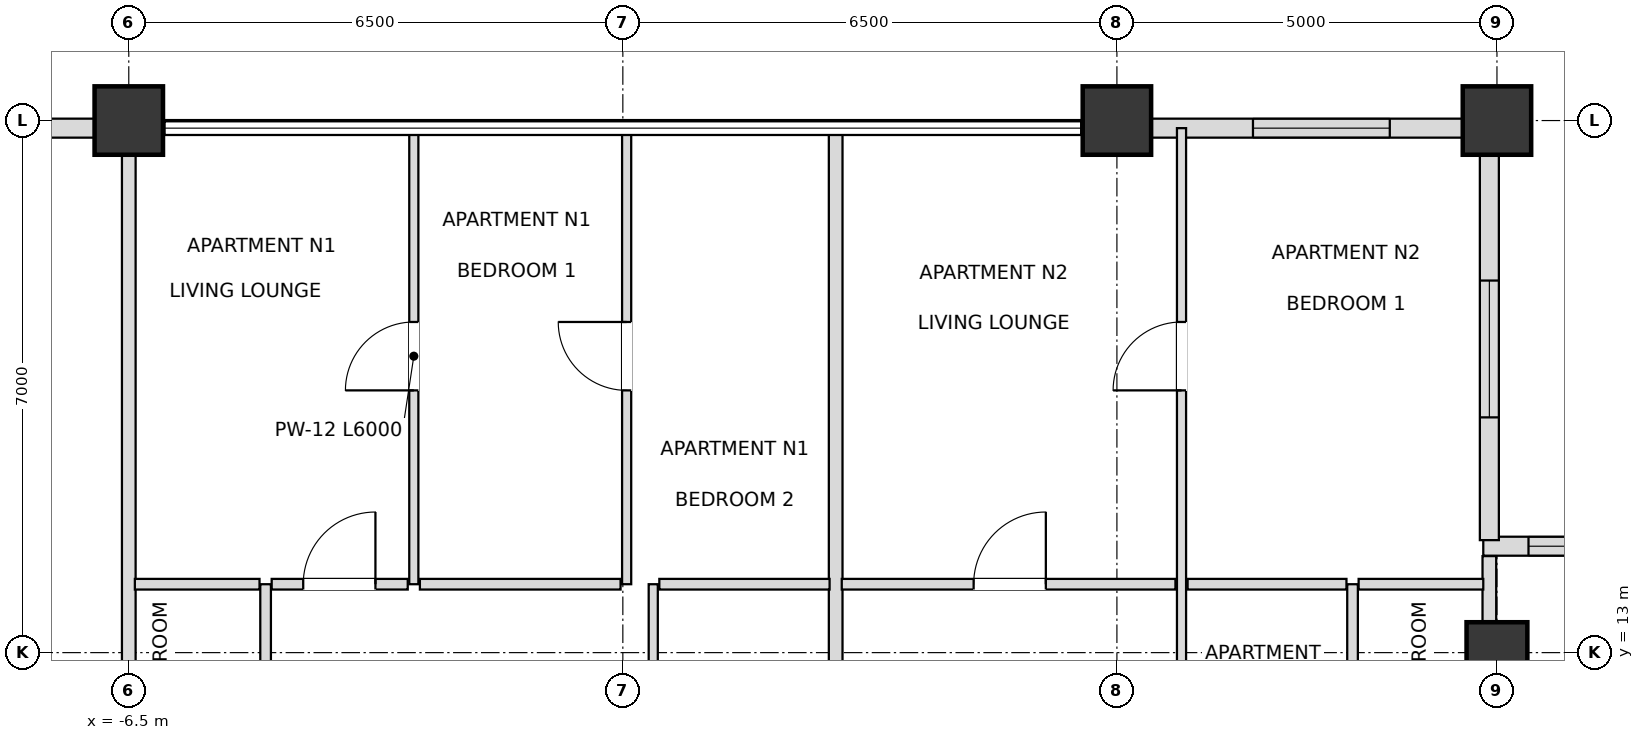
"""IFC4 building model, lengths in metres.
Left out: names, types, materials, properties, quantities, classifications, styles, units other than length and angle.
Written with IfcOpenShell. Run it as: python <this file> out.ifc"""

import sys

from ifc_helpers import new_model, si_unit, direction, frame, frame_2d, origin, origin_2d, place, context, subcontext, project, spatial, rectangle, extrude, element, fill, save


model = new_model("IFC4")
c1 = context("Model", 3, precision=1e-05, world=origin(), true_north=direction((0.0, 1.0)))
c2 = subcontext(c1, "Body", "Model", "MODEL_VIEW")
j1 = project(units=[si_unit("LENGTHUNIT", "METRE"), si_unit("PLANEANGLEUNIT", "RADIAN")], contexts=[c1])
p1 = place(None, origin())
s1 = spatial("IfcSite", under=j1, at=p1, CompositionType="ELEMENT")
p2 = place(p1, origin())
s2 = spatial("IfcBuilding", under=s1, at=p2, CompositionType="ELEMENT")
p3 = place(p2, frame((0.0, 0.0, 236.7)))
s3 = spatial("IfcBuildingStorey", under=s2, at=p3, CompositionType="ELEMENT", Elevation=236.7)
for number, where, z_axis, x_axis in (
    (1, (11.5, 20.0, 0.0), (0.0, 0.0, 1.0), (1.0, 0.0, 0.0)),
    (2, (6.5, 20.0, 0.0), (0.0, 0.0, 1.0), (1.0, 0.0, 0.0)),
    (3, (-6.5, 20.0, 0.0), (0.0, 0.0, 1.0), (1.0, 0.0, 0.0)),
):
    element("IfcColumn", number, at=place(p3, frame(where, z_axis=z_axis, x_axis=x_axis)), inside=s3, PredefinedType="USERDEFINED", context=c2, shape_type="SweptSolid", body=[
        extrude(rectangle(XDim=0.9, YDim=0.9, at=origin_2d()), origin(), (0.0, 0.0, 1.0), 3.6),
    ])
p4 = place(p3, frame((11.5, 13.0, 0.0), z_axis=(0.0, 0.0, 1.0), x_axis=(1.0, 0.0, 0.0)))
e4 = element("IfcColumn", 4, at=p4, inside=s3, PredefinedType="COLUMN", context=c2, shape_type="SweptSolid", body=[
    extrude(rectangle(XDim=0.8, YDim=0.8, at=origin_2d()), origin(), (0.0, 0.0, 1.0), 3.6),
])
p5 = place(p3, frame((11.055, 19.9, 0.0), z_axis=(0.0, 0.0, 1.0), x_axis=(-1.0, 0.0, 0.0)))
e5 = element("IfcWall", 5, at=p5, inside=s3, PredefinedType="SOLIDWALL", context=c2, shape_type="SweptSolid", body=[
    extrude(rectangle(XDim=4.11, YDim=0.25, at=frame_2d((2.055, 0.0))), origin(), (0.0, 0.0, 1.0), 2.748),
])
p6 = place(p5, frame((0.965, 0.0, 0.72)))
e6 = element("IfcOpeningElement", 6, at=p6, cuts=e5, PredefinedType="OPENING", context=c2, shape_type="SweptSolid", body=[
    extrude(rectangle(XDim=1.8, YDim=1.68, at=frame_2d((0.9, 0.84))), frame((0.0, 0.135, 0.0), z_axis=(0.0, -1.0, 0.0), x_axis=(1.0, 0.0, 0.0)), (0.0, 0.0, 1.0), 0.27),
])
p7 = place(p3, frame((-6.945, 19.9, 0.0), z_axis=(0.0, 0.0, 1.0), x_axis=(-1.0, 0.0, 0.0)))
e7 = element("IfcWall", 7, at=p7, inside=s3, PredefinedType="SOLIDWALL", context=c2, shape_type="SweptSolid", body=[
    extrude(rectangle(XDim=4.11, YDim=0.25, at=frame_2d((2.055, 0.0))), origin(), (0.0, 0.0, 1.0), 2.748),
])
p8 = place(p7, frame((1.155, 0.0, 0.72)))
e8 = element("IfcOpeningElement", 8, at=p8, cuts=e7, PredefinedType="OPENING", context=c2, shape_type="SweptSolid", body=[
    extrude(rectangle(XDim=1.8, YDim=1.68, at=frame_2d((0.9, 0.84))), frame((0.0, 0.135, 0.0), z_axis=(0.0, -1.0, 0.0), x_axis=(1.0, 0.0, 0.0)), (0.0, 0.0, 1.0), 0.27),
])
p9 = place(p3, frame((16.98, 14.4, 0.0), z_axis=(0.0, 0.0, 1.0), x_axis=(-1.0, 0.0, 0.0)))
e9 = element("IfcWall", 9, at=p9, inside=s3, PredefinedType="SOLIDWALL", context=c2, shape_type="SweptSolid", body=[
    extrude(rectangle(XDim=5.66, YDim=0.25, at=frame_2d((2.83, 0.0))), origin(), (0.0, 0.0, 1.0), 2.748),
])
p10 = place(p9, frame((0.595, 0.0, 0.72)))
e10 = element("IfcOpeningElement", 10, at=p10, cuts=e9, PredefinedType="OPENING", context=c2, shape_type="SweptSolid", body=[
    extrude(rectangle(XDim=1.8, YDim=1.68, at=frame_2d((0.9, 0.84))), frame((0.0, 0.135, 0.0), z_axis=(0.0, -1.0, 0.0), x_axis=(1.0, 0.0, 0.0)), (0.0, 0.0, 1.0), 0.27),
])
p11 = place(p9, frame((3.265, 0.0, 0.72)))
e11 = element("IfcOpeningElement", 11, at=p11, cuts=e9, PredefinedType="OPENING", context=c2, shape_type="SweptSolid", body=[
    extrude(rectangle(XDim=1.8, YDim=1.68, at=frame_2d((0.9, 0.84))), frame((0.0, 0.135, 0.0), z_axis=(0.0, -1.0, 0.0), x_axis=(1.0, 0.0, 0.0)), (0.0, 0.0, 1.0), 0.27),
])
p12 = place(p3, frame((11.4, 14.48, 0.0), z_axis=(0.0, 0.0, 1.0), x_axis=(0.0, 1.0, 0.0)))
e12 = element("IfcWall", 12, at=p12, inside=s3, PredefinedType="SOLIDWALL", context=c2, shape_type="SweptSolid", body=[
    extrude(rectangle(XDim=5.34, YDim=0.25, at=frame_2d((2.67, 0.0))), origin(), (0.0, 0.0, 1.0), 2.748),
])
p13 = place(p12, frame((1.615, 0.0, 0.72)))
e13 = element("IfcOpeningElement", 13, at=p13, cuts=e12, PredefinedType="OPENING", context=c2, shape_type="SweptSolid", body=[
    extrude(rectangle(XDim=1.8, YDim=1.68, at=frame_2d((0.9, 0.84))), frame((0.0, 0.135, 0.0), z_axis=(0.0, -1.0, 0.0), x_axis=(1.0, 0.0, 0.0)), (0.0, 0.0, 1.0), 0.27),
])
p14 = place(p3, frame((-6.5, 9.2, 0.0), z_axis=(0.0, 0.0, 1.0), x_axis=(0.0, 1.0, 0.0)))
e14 = element("IfcWall", 14, at=p14, inside=s3, PredefinedType="PARTITIONING", context=c2, shape_type="SweptSolid", body=[
    extrude(rectangle(XDim=10.7, YDim=0.18, at=frame_2d((5.35, 0.0))), origin(), (0.0, 0.0, 1.0), 2.826),
])
p15 = place(p3, frame((-4.7, 9.2, 0.0), z_axis=(0.0, 0.0, 1.0), x_axis=(0.0, 1.0, 0.0)))
e15 = element("IfcWall", 15, at=p15, inside=s3, PredefinedType="PARTITIONING", context=c2, shape_type="SweptSolid", body=[
    extrude(rectangle(XDim=4.7, YDim=0.14, at=frame_2d((2.35, 0.0))), origin(), (0.0, 0.0, 1.0), 3.38),
])
p16 = place(p15, frame((1.9, 0.0, 0.0)))
e16 = element("IfcOpeningElement", 16, at=p16, cuts=e15, PredefinedType="OPENING", context=c2, shape_type="SweptSolid", body=[
    extrude(rectangle(XDim=0.9, YDim=2.1, at=frame_2d((0.45, 1.05))), frame((0.0, 0.08, 0.0), z_axis=(0.0, -1.0, 0.0), x_axis=(1.0, 0.0, 0.0)), (0.0, 0.0, 1.0), 0.16),
])
p17 = place(p3, frame((-2.75, 13.9, 0.0), z_axis=(0.0, 0.0, 1.0), x_axis=(0.0, 1.0, 0.0)))
e17 = element("IfcWall", 17, at=p17, inside=s3, PredefinedType="PARTITIONING", context=c2, shape_type="SweptSolid", body=[
    extrude(rectangle(XDim=6.0, YDim=0.12, at=frame_2d((3.0, 0.0))), origin(), (0.0, 0.0, 1.0), 3.018),
])
p18 = place(p17, frame((2.55, 0.0, 0.0)))
e18 = element("IfcOpeningElement", 18, at=p18, cuts=e17, PredefinedType="OPENING", context=c2, shape_type="SweptSolid", body=[
    extrude(rectangle(XDim=0.9, YDim=2.1, at=frame_2d((0.45, 1.05))), frame((0.0, 0.07, 0.0), z_axis=(0.0, -1.0, 0.0), x_axis=(1.0, 0.0, 0.0)), (0.0, 0.0, 1.0), 0.14),
])
p19 = place(p3, frame((0.05, 13.9, 0.0), z_axis=(0.0, 0.0, 1.0), x_axis=(0.0, 1.0, 0.0)))
e19 = element("IfcWall", 19, at=p19, inside=s3, PredefinedType="PARTITIONING", context=c2, shape_type="SweptSolid", body=[
    extrude(rectangle(XDim=6.0, YDim=0.12, at=frame_2d((3.0, 0.0))), origin(), (0.0, 0.0, 1.0), 3.018),
])
p20 = place(p19, frame((2.55, 0.0, 0.0)))
e20 = element("IfcOpeningElement", 20, at=p20, cuts=e19, PredefinedType="OPENING", context=c2, shape_type="SweptSolid", body=[
    extrude(rectangle(XDim=0.9, YDim=2.1, at=frame_2d((0.45, 1.05))), frame((0.0, 0.07, 0.0), z_axis=(0.0, -1.0, 0.0), x_axis=(1.0, 0.0, 0.0)), (0.0, 0.0, 1.0), 0.14),
])
p21 = place(p3, frame((0.4, 9.2, 0.0), z_axis=(0.0, 0.0, 1.0), x_axis=(0.0, 1.0, 0.0)))
e21 = element("IfcWall", 21, at=p21, inside=s3, PredefinedType="PARTITIONING", context=c2, shape_type="SweptSolid", body=[
    extrude(rectangle(XDim=4.7, YDim=0.12, at=frame_2d((2.35, 0.0))), origin(), (0.0, 0.0, 1.0), 3.38),
])
p22 = place(p21, frame((1.875, 0.0, 0.0)))
e22 = element("IfcOpeningElement", 22, at=p22, cuts=e21, PredefinedType="OPENING", context=c2, shape_type="SweptSolid", body=[
    extrude(rectangle(XDim=0.95, YDim=2.1, at=frame_2d((0.475, 1.05))), frame((0.0, 0.07, 0.0), z_axis=(0.0, -1.0, 0.0), x_axis=(1.0, 0.0, 0.0)), (0.0, 0.0, 1.0), 0.14),
])
p23 = place(p3, frame((2.8, 9.2, 0.0), z_axis=(0.0, 0.0, 1.0), x_axis=(0.0, 1.0, 0.0)))
e23 = element("IfcWall", 23, at=p23, inside=s3, PredefinedType="PARTITIONING", context=c2, shape_type="SweptSolid", body=[
    extrude(rectangle(XDim=10.7, YDim=0.18, at=frame_2d((5.35, 0.0))), origin(), (0.0, 0.0, 1.0), 3.018),
])
p24 = place(p3, frame((7.35, 9.2, 0.0), z_axis=(0.0, 0.0, 1.0), x_axis=(0.0, 1.0, 0.0)))
e24 = element("IfcWall", 24, at=p24, inside=s3, PredefinedType="PARTITIONING", context=c2, shape_type="SweptSolid", body=[
    extrude(rectangle(XDim=10.7, YDim=0.12, at=frame_2d((5.35, 0.0))), origin(), (0.0, 0.0, 1.0), 2.826),
])
p25 = place(p24, frame((1.875, 0.0, 0.0)))
e25 = element("IfcOpeningElement", 25, at=p25, cuts=e24, PredefinedType="OPENING", context=c2, shape_type="SweptSolid", body=[
    extrude(rectangle(XDim=0.95, YDim=2.1, at=frame_2d((0.475, 1.05))), frame((0.0, 0.07, 0.0), z_axis=(0.0, -1.0, 0.0), x_axis=(1.0, 0.0, 0.0)), (0.0, 0.0, 1.0), 0.14),
])
p26 = place(p24, frame((7.25, 0.0, 0.0)))
e26 = element("IfcOpeningElement", 26, at=p26, cuts=e24, PredefinedType="OPENING", context=c2, shape_type="SweptSolid", body=[
    extrude(rectangle(XDim=0.9, YDim=2.1, at=frame_2d((0.45, 1.05))), frame((0.0, 0.07, 0.0), z_axis=(0.0, -1.0, 0.0), x_axis=(1.0, 0.0, 0.0)), (0.0, 0.0, 1.0), 0.14),
])
p27 = place(p3, frame((9.6, 9.2, 0.0), z_axis=(0.0, 0.0, 1.0), x_axis=(0.0, 1.0, 0.0)))
e27 = element("IfcWall", 27, at=p27, inside=s3, PredefinedType="PARTITIONING", context=c2, shape_type="SweptSolid", body=[
    extrude(rectangle(XDim=4.7, YDim=0.14, at=frame_2d((2.35, 0.0))), origin(), (0.0, 0.0, 1.0), 2.826),
])
p28 = place(p27, frame((1.9, 0.0, 0.0)))
e28 = element("IfcOpeningElement", 28, at=p28, cuts=e27, PredefinedType="OPENING", context=c2, shape_type="SweptSolid", body=[
    extrude(rectangle(XDim=0.9, YDim=2.1, at=frame_2d((0.45, 1.05))), frame((0.0, 0.08, 0.0), z_axis=(0.0, -1.0, 0.0), x_axis=(1.0, 0.0, 0.0)), (0.0, 0.0, 1.0), 0.16),
])
p29 = place(p3, frame((11.4, 9.2, 0.0), z_axis=(0.0, 0.0, 1.0), x_axis=(0.0, 1.0, 0.0)))
e29 = element("IfcWall", 29, at=p29, inside=s3, PredefinedType="PARTITIONING", context=c2, shape_type="SweptSolid", body=[
    extrude(rectangle(XDim=5.07, YDim=0.18, at=frame_2d((2.535, 0.0))), origin(), (0.0, 0.0, 1.0), 2.748),
])
p30 = place(p3, frame((-6.42, 13.9, 0.0), z_axis=(0.0, 0.0, 1.0), x_axis=(1.0, 0.0, 0.0)))
e30 = element("IfcWall", 30, at=p30, inside=s3, PredefinedType="PARTITIONING", context=c2, shape_type="SweptSolid", body=[
    extrude(rectangle(XDim=1.64, YDim=0.14, at=frame_2d((0.82, 0.0))), origin(), (0.0, 0.0, 1.0), 3.38),
])
p31 = place(p3, frame((-4.62, 13.9, 0.0), z_axis=(0.0, 0.0, 1.0), x_axis=(1.0, 0.0, 0.0)))
e31 = element("IfcWall", 31, at=p31, inside=s3, PredefinedType="PARTITIONING", context=c2, shape_type="SweptSolid", body=[
    extrude(rectangle(XDim=1.79, YDim=0.14, at=frame_2d((0.895, 0.0))), origin(), (0.0, 0.0, 1.0), 3.38),
])
p32 = place(p31, frame((0.415, 0.0, 0.0)))
e32 = element("IfcOpeningElement", 32, at=p32, cuts=e31, PredefinedType="OPENING", context=c2, shape_type="SweptSolid", body=[
    extrude(rectangle(XDim=0.95, YDim=2.1, at=frame_2d((0.475, 1.05))), frame((0.0, 0.08, 0.0), z_axis=(0.0, -1.0, 0.0), x_axis=(1.0, 0.0, 0.0)), (0.0, 0.0, 1.0), 0.16),
])
p33 = place(p3, frame((-2.67, 13.9, 0.0), z_axis=(0.0, 0.0, 1.0), x_axis=(1.0, 0.0, 0.0)))
e33 = element("IfcWall", 33, at=p33, inside=s3, PredefinedType="PARTITIONING", context=c2, shape_type="SweptSolid", body=[
    extrude(rectangle(XDim=2.64, YDim=0.14, at=frame_2d((1.32, 0.0))), origin(), (0.0, 0.0, 1.0), 3.38),
])
p34 = place(p3, frame((0.48, 13.9, 0.0), z_axis=(0.0, 0.0, 1.0), x_axis=(1.0, 0.0, 0.0)))
e34 = element("IfcWall", 34, at=p34, inside=s3, PredefinedType="PARTITIONING", context=c2, shape_type="SweptSolid", body=[
    extrude(rectangle(XDim=2.24, YDim=0.14, at=frame_2d((1.12, 0.0))), origin(), (0.0, 0.0, 1.0), 3.38),
])
p35 = place(p3, frame((2.88, 13.9, 0.0), z_axis=(0.0, 0.0, 1.0), x_axis=(1.0, 0.0, 0.0)))
e35 = element("IfcWall", 35, at=p35, inside=s3, PredefinedType="PARTITIONING", context=c2, shape_type="SweptSolid", body=[
    extrude(rectangle(XDim=4.39, YDim=0.14, at=frame_2d((2.195, 0.0))), origin(), (0.0, 0.0, 1.0), 2.826),
])
p36 = place(p35, frame((1.735, 0.0, 0.0)))
e36 = element("IfcOpeningElement", 36, at=p36, cuts=e35, PredefinedType="OPENING", context=c2, shape_type="SweptSolid", body=[
    extrude(rectangle(XDim=0.95, YDim=2.1, at=frame_2d((0.475, 1.05))), frame((0.0, 0.08, 0.0), z_axis=(0.0, -1.0, 0.0), x_axis=(1.0, 0.0, 0.0)), (0.0, 0.0, 1.0), 0.16),
])
p37 = place(p3, frame((7.43, 13.9, 0.0), z_axis=(0.0, 0.0, 1.0), x_axis=(1.0, 0.0, 0.0)))
e37 = element("IfcWall", 37, at=p37, inside=s3, PredefinedType="PARTITIONING", context=c2, shape_type="SweptSolid", body=[
    extrude(rectangle(XDim=2.09, YDim=0.14, at=frame_2d((1.045, 0.0))), origin(), (0.0, 0.0, 1.0), 3.38),
])
p38 = place(p3, frame((9.68, 13.9, 0.0), z_axis=(0.0, 0.0, 1.0), x_axis=(1.0, 0.0, 0.0)))
e38 = element("IfcWall", 38, at=p38, inside=s3, PredefinedType="PARTITIONING", context=c2, shape_type="SweptSolid", body=[
    extrude(rectangle(XDim=1.64, YDim=0.14, at=frame_2d((0.82, 0.0))), origin(), (0.0, 0.0, 1.0), 3.38),
])
p39 = place(p6, origin())
e39 = element("IfcWindow", 39, at=p39, inside=s3, PartitioningType="SINGLE_PANEL", PredefinedType="WINDOW", context=c2, shape_type="SweptSolid", body=[
    extrude(rectangle(XDim=1.8, YDim=1.68, at=frame_2d((0.9, 0.84))), frame((0.0, 0.03, 0.0), z_axis=(0.0, -1.0, 0.0), x_axis=(1.0, 0.0, 0.0)), (0.0, 0.0, 1.0), 0.06),
])
fill(e6, e39)
p40 = place(p11, origin())
e40 = element("IfcWindow", 40, at=p40, inside=s3, PartitioningType="SINGLE_PANEL", PredefinedType="WINDOW", context=c2, shape_type="SweptSolid", body=[
    extrude(rectangle(XDim=1.8, YDim=1.68, at=frame_2d((0.9, 0.84))), frame((0.0, 0.03, 0.0), z_axis=(0.0, -1.0, 0.0), x_axis=(1.0, 0.0, 0.0)), (0.0, 0.0, 1.0), 0.06),
])
fill(e11, e40)
p41 = place(p13, origin())
e41 = element("IfcWindow", 41, at=p41, inside=s3, PartitioningType="SINGLE_PANEL", PredefinedType="WINDOW", context=c2, shape_type="SweptSolid", body=[
    extrude(rectangle(XDim=1.8, YDim=1.68, at=frame_2d((0.9, 0.84))), frame((0.0, 0.03, 0.0), z_axis=(0.0, -1.0, 0.0), x_axis=(1.0, 0.0, 0.0)), (0.0, 0.0, 1.0), 0.06),
])
fill(e13, e41)
p42 = place(p32, origin())
e42 = element("IfcDoor", 42, at=p42, inside=s3, OperationType="SINGLE_SWING_RIGHT", PredefinedType="DOOR", context=c2, shape_type="SweptSolid", body=[
    extrude(rectangle(XDim=0.95, YDim=2.1, at=frame_2d((0.475, 1.05))), frame((0.0, 0.025, 0.0), z_axis=(0.0, -1.0, 0.0), x_axis=(1.0, 0.0, 0.0)), (0.0, 0.0, 1.0), 0.05),
])
fill(e32, e42)
p43 = place(p18, origin())
e43 = element("IfcDoor", 43, at=p43, inside=s3, OperationType="SINGLE_SWING_LEFT", PredefinedType="DOOR", context=c2, shape_type="SweptSolid", body=[
    extrude(rectangle(XDim=0.9, YDim=2.1, at=frame_2d((0.45, 1.05))), frame((0.0, 0.025, 0.0), z_axis=(0.0, -1.0, 0.0), x_axis=(1.0, 0.0, 0.0)), (0.0, 0.0, 1.0), 0.05),
])
fill(e18, e43)
p44 = place(p20, origin())
e44 = element("IfcDoor", 44, at=p44, inside=s3, OperationType="SINGLE_SWING_RIGHT", PredefinedType="DOOR", context=c2, shape_type="SweptSolid", body=[
    extrude(rectangle(XDim=0.9, YDim=2.1, at=frame_2d((0.45, 1.05))), frame((0.0, 0.025, 0.0), z_axis=(0.0, -1.0, 0.0), x_axis=(1.0, 0.0, 0.0)), (0.0, 0.0, 1.0), 0.05),
])
fill(e20, e44)
p45 = place(p36, origin())
e45 = element("IfcDoor", 45, at=p45, inside=s3, OperationType="SINGLE_SWING_RIGHT", PredefinedType="DOOR", context=c2, shape_type="SweptSolid", body=[
    extrude(rectangle(XDim=0.95, YDim=2.1, at=frame_2d((0.475, 1.05))), frame((0.0, 0.025, 0.0), z_axis=(0.0, -1.0, 0.0), x_axis=(1.0, 0.0, 0.0)), (0.0, 0.0, 1.0), 0.05),
])
fill(e36, e45)
p46 = place(p26, origin())
e46 = element("IfcDoor", 46, at=p46, inside=s3, OperationType="SINGLE_SWING_LEFT", PredefinedType="DOOR", context=c2, shape_type="SweptSolid", body=[
    extrude(rectangle(XDim=0.9, YDim=2.1, at=frame_2d((0.45, 1.05))), frame((0.0, 0.025, 0.0), z_axis=(0.0, -1.0, 0.0), x_axis=(1.0, 0.0, 0.0)), (0.0, 0.0, 1.0), 0.05),
])
fill(e26, e46)
save(model, sys.argv[1])
